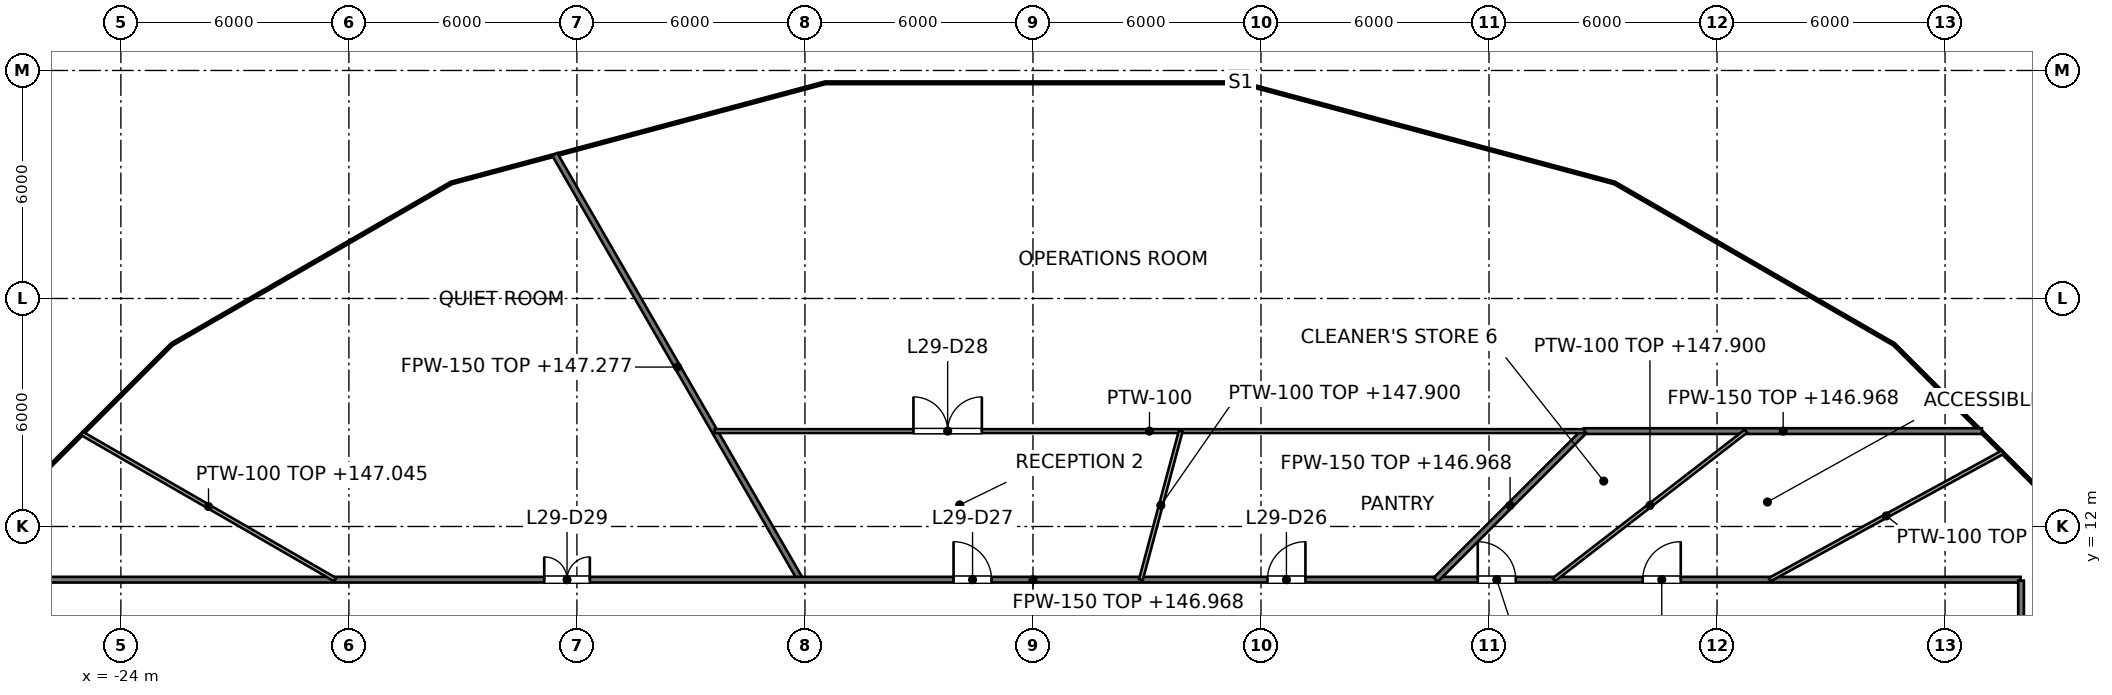
"""IFC4 building model, lengths in metres.
Left out: names, types, materials, properties, quantities, classifications, styles, units other than length and angle.
Written with IfcOpenShell. Run it as: python <this file> out.ifc"""

import sys

from ifc_helpers import new_model, si_unit, direction, frame, frame_2d, origin, place, context, subcontext, project, spatial, rectangle, extrude, element, fill, save


model = new_model("IFC4")
c1 = context("Model", 3, precision=1e-05, world=origin(), true_north=direction((0.0, 1.0)))
c2 = subcontext(c1, "Body", "Model", "MODEL_VIEW")
j1 = project(units=[si_unit("LENGTHUNIT", "METRE"), si_unit("PLANEANGLEUNIT", "RADIAN")], contexts=[c1])
p1 = place(None, origin())
s1 = spatial("IfcSite", under=j1, at=p1, CompositionType="ELEMENT")
p2 = place(p1, origin())
s2 = spatial("IfcBuilding", under=s1, at=p2, CompositionType="ELEMENT")
p3 = place(p2, frame((0.0, 0.0, 144.0)))
s3 = spatial("IfcBuildingStorey", under=s2, at=p3, CompositionType="ELEMENT", Elevation=144.0)
p4 = place(p3, frame((-12.581, 21.79, 0.0), z_axis=(0.0, 0.0, 1.0), x_axis=(0.500038653944, -0.866003085769, 0.0)))
e1 = element("IfcWall", 1, at=p4, inside=s3, PredefinedType="PARTITIONING", context=c2, shape_type="SweptSolid", body=[
    extrude(rectangle(XDim=12.921, YDim=0.15, at=frame_2d((6.461, 0.0))), origin(), (0.0, 0.0, 1.0), 3.277),
])
p5 = place(p3, frame((-25.986, 10.6, 0.0), z_axis=(0.0, 0.0, 1.0), x_axis=(1.0, 0.0, 0.0)))
e2 = element("IfcWall", 2, at=p5, inside=s3, PredefinedType="PARTITIONING", context=c2, shape_type="SweptSolid", body=[
    extrude(rectangle(XDim=51.972, YDim=0.15, at=frame_2d((25.986, 0.0))), origin(), (0.0, 0.0, 1.0), 2.968),
])
p6 = place(p5, frame((42.031, 0.0, 0.0)))
e3 = element("IfcOpeningElement", 3, at=p6, cuts=e2, PredefinedType="OPENING", context=c2, shape_type="SweptSolid", body=[
    extrude(rectangle(XDim=1.0, YDim=2.1, at=frame_2d((0.5, 1.05))), frame((0.0, 0.075, 0.0), z_axis=(0.0, -1.0, 0.0), x_axis=(1.0, 0.0, 0.0)), (0.0, 0.0, 1.0), 0.15),
])
p7 = place(p5, frame((37.69, 0.0, 0.0)))
e4 = element("IfcOpeningElement", 4, at=p7, cuts=e2, PredefinedType="OPENING", context=c2, shape_type="SweptSolid", body=[
    extrude(rectangle(XDim=1.0, YDim=2.1, at=frame_2d((0.5, 1.05))), frame((0.0, 0.075, 0.0), z_axis=(0.0, -1.0, 0.0), x_axis=(1.0, 0.0, 0.0)), (0.0, 0.0, 1.0), 0.15),
])
p8 = place(p5, frame((32.156, 0.0, 0.0)))
e5 = element("IfcOpeningElement", 5, at=p8, cuts=e2, PredefinedType="OPENING", context=c2, shape_type="SweptSolid", body=[
    extrude(rectangle(XDim=1.0, YDim=2.1, at=frame_2d((0.5, 1.05))), frame((0.0, 0.075, 0.0), z_axis=(0.0, -1.0, 0.0), x_axis=(1.0, 0.0, 0.0)), (0.0, 0.0, 1.0), 0.15),
])
p9 = place(p5, frame((23.896, 0.0, 0.0)))
e6 = element("IfcOpeningElement", 6, at=p9, cuts=e2, PredefinedType="OPENING", context=c2, shape_type="SweptSolid", body=[
    extrude(rectangle(XDim=1.0, YDim=2.1, at=frame_2d((0.5, 1.05))), frame((0.0, 0.075, 0.0), z_axis=(0.0, -1.0, 0.0), x_axis=(1.0, 0.0, 0.0)), (0.0, 0.0, 1.0), 0.15),
])
p10 = place(p5, frame((13.126, 0.0, 0.0)))
e7 = element("IfcOpeningElement", 7, at=p10, cuts=e2, PredefinedType="OPENING", context=c2, shape_type="SweptSolid", body=[
    extrude(rectangle(XDim=1.2, YDim=2.1, at=frame_2d((0.6, 1.05))), frame((0.0, 0.075, 0.0), z_axis=(0.0, -1.0, 0.0), x_axis=(1.0, 0.0, 0.0)), (0.0, 0.0, 1.0), 0.15),
])
p11 = place(p3, frame((14.51, 14.51, 0.0), z_axis=(0.0, 0.0, 1.0), x_axis=(1.0, 0.0, 0.0)))
e8 = element("IfcWall", 8, at=p11, inside=s3, PredefinedType="PARTITIONING", context=c2, shape_type="SweptSolid", body=[
    extrude(rectangle(XDim=10.46, YDim=0.15, at=frame_2d((5.23, 0.0))), origin(), (0.0, 0.0, 1.0), 2.968),
])
p12 = place(p3, frame((10.6, 10.6, 0.0), z_axis=(0.0, 0.0, 1.0), x_axis=(0.707106781187, 0.707106781187, 0.0)))
e9 = element("IfcWall", 9, at=p12, inside=s3, PredefinedType="PARTITIONING", context=c2, shape_type="SweptSolid", body=[
    extrude(rectangle(XDim=5.53, YDim=0.15, at=frame_2d((2.765, 0.0))), origin(), (0.0, 0.0, 1.0), 2.968),
])
p13 = place(p3, frame((26.0, 7.8, 0.0), z_axis=(0.0, 0.0, 1.0), x_axis=(0.0, 1.0, 0.0)))
e10 = element("IfcWall", 10, at=p13, inside=s3, PredefinedType="PARTITIONING", context=c2, shape_type="SweptSolid", body=[
    extrude(rectangle(XDim=2.775, YDim=0.15, at=frame_2d((1.387, 0.0))), origin(), (0.0, 0.0, 1.0), 2.977),
])
p14 = place(p3, frame((-25.029, 14.451, 0.0), z_axis=(0.0, 0.0, 1.0), x_axis=(0.865996573404, -0.500049932359, 0.0)))
e11 = element("IfcWall", 11, at=p14, inside=s3, PredefinedType="PARTITIONING", context=c2, shape_type="SweptSolid", body=[
    extrude(rectangle(XDim=7.701, YDim=0.1, at=frame_2d((3.851, 0.0))), origin(), (0.0, 0.0, 1.0), 3.045),
])
p15 = place(p3, frame((-8.378, 14.51, 0.0), z_axis=(0.0, 0.0, 1.0), x_axis=(1.0, 0.0, 0.0)))
e12 = element("IfcWall", 12, at=p15, inside=s3, PredefinedType="PARTITIONING", context=c2, shape_type="SweptSolid", body=[
    extrude(rectangle(XDim=22.888, YDim=0.1, at=frame_2d((11.444, 0.0))), origin(), (0.0, 0.0, 1.0), 2.968),
])
p16 = place(p15, frame((5.233, 0.0, 0.0)))
e13 = element("IfcOpeningElement", 13, at=p16, cuts=e12, PredefinedType="OPENING", context=c2, shape_type="SweptSolid", body=[
    extrude(rectangle(XDim=1.8, YDim=2.1, at=frame_2d((0.9, 1.05))), frame((0.0, 0.05, 0.0), z_axis=(0.0, -1.0, 0.0), x_axis=(1.0, 0.0, 0.0)), (0.0, 0.0, 1.0), 0.1),
])
p17 = place(p3, frame((19.384, 10.6, 0.0), z_axis=(0.0, 0.0, 1.0), x_axis=(0.877388352769, 0.479780865006, 0.0)))
e14 = element("IfcWall", 14, at=p17, inside=s3, PredefinedType="PARTITIONING", context=c2, shape_type="SweptSolid", body=[
    extrude(rectangle(XDim=6.997, YDim=0.1, at=frame_2d((3.499, 0.0))), origin(), (0.0, 0.0, 1.0), 3.474),
])
p18 = place(p3, frame((13.707, 10.6, 0.0), z_axis=(0.0, 0.0, 1.0), x_axis=(0.791052244704, 0.611748597177, 0.0)))
e15 = element("IfcWall", 15, at=p18, inside=s3, PredefinedType="PARTITIONING", context=c2, shape_type="SweptSolid", body=[
    extrude(rectangle(XDim=6.391, YDim=0.1, at=frame_2d((3.196, 0.0))), origin(), (0.0, 0.0, 1.0), 3.9),
])
p19 = place(p3, frame((2.84, 10.6, 0.0), z_axis=(0.0, 0.0, 1.0), x_axis=(0.258863707653, 0.965913857888, 0.0)))
e16 = element("IfcWall", 16, at=p19, inside=s3, PredefinedType="PARTITIONING", context=c2, shape_type="SweptSolid", body=[
    extrude(rectangle(XDim=4.048, YDim=0.1, at=frame_2d((2.024, 0.0))), origin(), (0.0, 0.0, 1.0), 3.9),
])
p20 = place(p6, origin())
e17 = element("IfcDoor", 17, at=p20, inside=s3, OperationType="SINGLE_SWING_RIGHT", PredefinedType="DOOR", context=c2, shape_type="SweptSolid", body=[
    extrude(rectangle(XDim=1.0, YDim=2.1, at=frame_2d((0.5, 1.05))), frame((0.0, 0.025, 0.0), z_axis=(0.0, -1.0, 0.0), x_axis=(1.0, 0.0, 0.0)), (0.0, 0.0, 1.0), 0.05),
])
fill(e3, e17)
p21 = place(p7, origin())
e18 = element("IfcDoor", 18, at=p21, inside=s3, OperationType="SINGLE_SWING_LEFT", PredefinedType="DOOR", context=c2, shape_type="SweptSolid", body=[
    extrude(rectangle(XDim=1.0, YDim=2.1, at=frame_2d((0.5, 1.05))), frame((0.0, 0.025, 0.0), z_axis=(0.0, -1.0, 0.0), x_axis=(1.0, 0.0, 0.0)), (0.0, 0.0, 1.0), 0.05),
])
fill(e4, e18)
p22 = place(p8, origin())
e19 = element("IfcDoor", 19, at=p22, inside=s3, OperationType="SINGLE_SWING_RIGHT", PredefinedType="DOOR", context=c2, shape_type="SweptSolid", body=[
    extrude(rectangle(XDim=1.0, YDim=2.1, at=frame_2d((0.5, 1.05))), frame((0.0, 0.025, 0.0), z_axis=(0.0, -1.0, 0.0), x_axis=(1.0, 0.0, 0.0)), (0.0, 0.0, 1.0), 0.05),
])
fill(e5, e19)
p23 = place(p9, origin())
e20 = element("IfcDoor", 20, at=p23, inside=s3, OperationType="SINGLE_SWING_LEFT", PredefinedType="DOOR", context=c2, shape_type="SweptSolid", body=[
    extrude(rectangle(XDim=1.0, YDim=2.1, at=frame_2d((0.5, 1.05))), frame((0.0, 0.025, 0.0), z_axis=(0.0, -1.0, 0.0), x_axis=(1.0, 0.0, 0.0)), (0.0, 0.0, 1.0), 0.05),
])
fill(e6, e20)
p24 = place(p16, origin())
e21 = element("IfcDoor", 21, at=p24, inside=s3, OperationType="DOUBLE_DOOR_SINGLE_SWING", PredefinedType="DOOR", context=c2, shape_type="SweptSolid", body=[
    extrude(rectangle(XDim=1.8, YDim=2.1, at=frame_2d((0.9, 1.05))), frame((0.0, 0.025, 0.0), z_axis=(0.0, -1.0, 0.0), x_axis=(1.0, 0.0, 0.0)), (0.0, 0.0, 1.0), 0.05),
])
fill(e13, e21)
p25 = place(p10, origin())
e22 = element("IfcDoor", 22, at=p25, inside=s3, OperationType="DOUBLE_DOOR_SINGLE_SWING", PredefinedType="DOOR", context=c2, shape_type="SweptSolid", body=[
    extrude(rectangle(XDim=1.2, YDim=2.1, at=frame_2d((0.6, 1.05))), frame((0.0, 0.025, 0.0), z_axis=(0.0, -1.0, 0.0), x_axis=(1.0, 0.0, 0.0)), (0.0, 0.0, 1.0), 0.05),
])
fill(e7, e22)
save(model, sys.argv[1])
